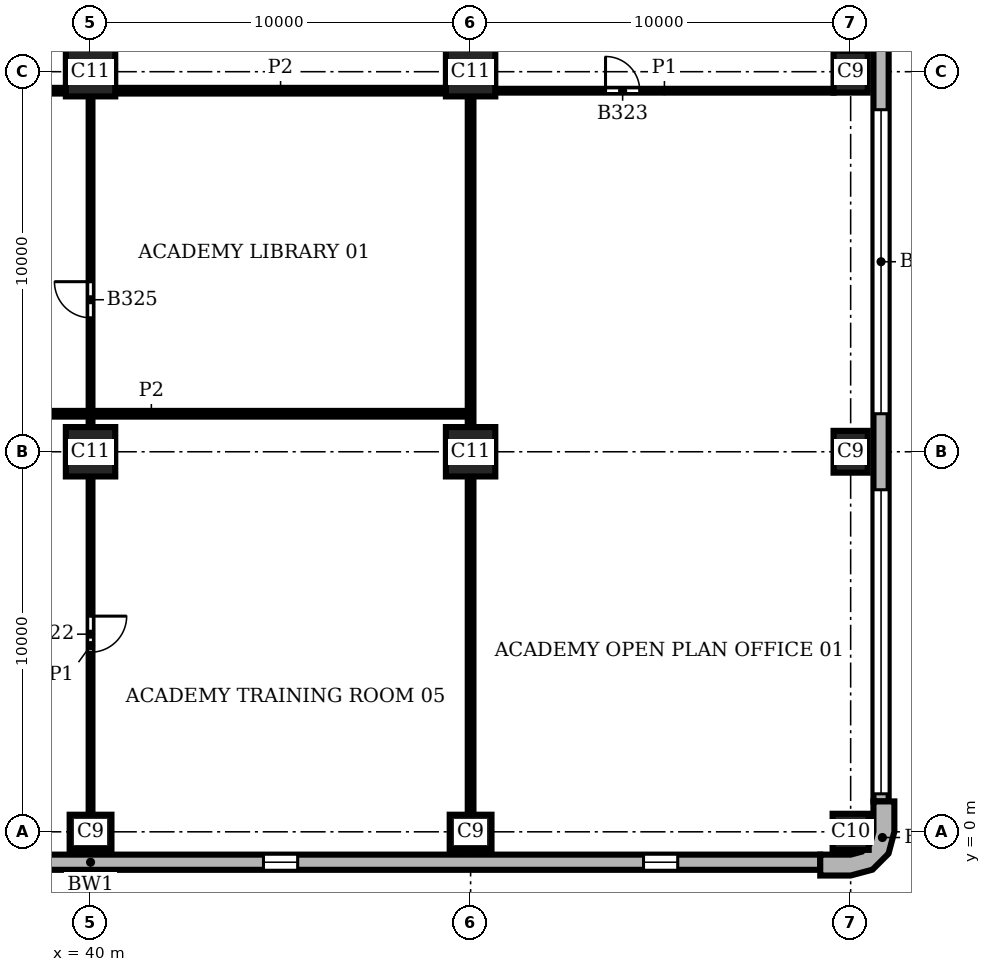
"""IFC4 building model, lengths in metres.
Left out: names, types, materials, properties, quantities, classifications, styles, units other than length and angle.
Written with IfcOpenShell. Run it as: python <this file> out.ifc"""

import sys

from ifc_helpers import new_model, si_unit, direction, frame, frame_2d, origin, origin_2d, place, context, subcontext, project, spatial, polyline, rectangle, outline, extrude, element, fill, save


model = new_model("IFC4")
c1 = context("Model", 3, precision=1e-05, world=origin(), true_north=direction((0.0, 1.0)))
c2 = subcontext(c1, "Body", "Model", "MODEL_VIEW")
j1 = project(units=[si_unit("LENGTHUNIT", "METRE"), si_unit("PLANEANGLEUNIT", "RADIAN")], contexts=[c1])
p1 = place(None, origin())
s1 = spatial("IfcSite", under=j1, at=p1, CompositionType="ELEMENT")
p2 = place(p1, origin())
s2 = spatial("IfcBuilding", under=s1, at=p2, CompositionType="ELEMENT")
p3 = place(p2, frame((0.0, 0.0, 155.1)))
s3 = spatial("IfcBuildingStorey", under=s2, at=p3, CompositionType="ELEMENT", Elevation=155.1)
for number, where, z_axis, x_axis in (
    (1, (40.0, 0.0, 0.0), (0.0, 0.0, 1.0), (1.0, 0.0, 0.0)),
    (2, (50.0, 0.0, 0.0), (0.0, 0.0, 1.0), (1.0, 0.0, 0.0)),
):
    element("IfcColumn", number, at=place(p3, frame(where, z_axis=z_axis, x_axis=x_axis)), inside=s3, PredefinedType="COLUMN", context=c2, shape_type="SweptSolid", body=[
        extrude(rectangle(XDim=1.1, YDim=0.9, at=origin_2d()), origin(), (0.0, 0.0, 1.0), 3.9),
    ])
p4 = place(p3, frame((60.0, 0.0, 0.0), z_axis=(0.0, 0.0, 1.0), x_axis=(1.0, 0.0, 0.0)))
e3 = element("IfcColumn", 3, at=p4, inside=s3, PredefinedType="COLUMN", context=c2, shape_type="SweptSolid", body=[
    extrude(rectangle(XDim=0.95, YDim=0.95, at=origin_2d()), origin(), (0.0, 0.0, 1.0), 3.9),
])
for number, where, z_axis, x_axis in (
    (4, (60.0, 10.0, 0.0), (0.0, 0.0, 1.0), (0.0, 1.0, 0.0)),
    (5, (60.0, 20.0, 0.0), (0.0, 0.0, 1.0), (0.0, 1.0, 0.0)),
):
    element("IfcColumn", number, at=place(p3, frame(where, z_axis=z_axis, x_axis=x_axis)), inside=s3, PredefinedType="COLUMN", context=c2, shape_type="SweptSolid", body=[
        extrude(rectangle(XDim=1.1, YDim=0.9, at=origin_2d()), origin(), (0.0, 0.0, 1.0), 3.9),
    ])
for number, where, z_axis, x_axis in (
    (6, (40.0, 10.0, 0.0), (0.0, 0.0, 1.0), (1.0, 0.0, 0.0)),
    (7, (40.0, 20.0, 0.0), (0.0, 0.0, 1.0), (1.0, 0.0, 0.0)),
    (8, (50.0, 10.0, 0.0), (0.0, 0.0, 1.0), (1.0, 0.0, 0.0)),
    (9, (50.0, 20.0, 0.0), (0.0, 0.0, 1.0), (1.0, 0.0, 0.0)),
):
    element("IfcColumn", number, at=place(p3, frame(where, z_axis=z_axis, x_axis=x_axis)), inside=s3, PredefinedType="COLUMN", context=c2, shape_type="SweptSolid", body=[
        extrude(rectangle(XDim=1.3, YDim=1.3, at=origin_2d()), origin(), (0.0, 0.0, 1.0), 3.9),
    ])
p5 = place(p3, origin())
e10 = element("IfcWall", 10, at=p5, inside=s3, PredefinedType="SOLIDWALL", context=c2, shape_type="SweptSolid", body=[
    extrude(outline(polyline([(59.2, -1.0), (59.2, -1.15), (60.0, -1.15), (60.575, -0.996), (60.996, -0.575), (61.15, 0.0), (61.15, 0.8), (61.0, 0.8), (60.6, 0.8), (60.6, 0.0), (60.52, -0.3), (60.3, -0.52), (60.0, -0.6), (59.2, -0.6), (59.2, -1.0)])), origin(), (0.0, 0.0, 1.0), 3.9),
])
p6 = place(p3, frame((20.8, -0.8, 0.0), z_axis=(0.0, 0.0, 1.0), x_axis=(1.0, 0.0, 0.0)))
e11 = element("IfcWall", 11, at=p6, inside=s3, PredefinedType="SOLIDWALL", context=c2, shape_type="SweptSolid", body=[
    extrude(rectangle(XDim=38.4, YDim=0.4, at=frame_2d((19.2, 0.0))), origin(), (0.0, 0.0, 1.0), 3.9),
])
p7 = place(p6, frame((3.75, 0.0, 0.9)))
e12 = element("IfcOpeningElement", 12, at=p7, cuts=e11, PredefinedType="OPENING", context=c2, shape_type="SweptSolid", body=[
    extrude(rectangle(XDim=0.9, YDim=2.35, at=frame_2d((0.45, 1.175))), frame((0.0, 0.21, 0.0), z_axis=(0.0, -1.0, 0.0), x_axis=(1.0, 0.0, 0.0)), (0.0, 0.0, 1.0), 0.42),
])
p8 = place(p6, frame((13.75, 0.0, 0.9)))
e13 = element("IfcOpeningElement", 13, at=p8, cuts=e11, PredefinedType="OPENING", context=c2, shape_type="SweptSolid", body=[
    extrude(rectangle(XDim=0.9, YDim=2.35, at=frame_2d((0.45, 1.175))), frame((0.0, 0.21, 0.0), z_axis=(0.0, -1.0, 0.0), x_axis=(1.0, 0.0, 0.0)), (0.0, 0.0, 1.0), 0.42),
])
p9 = place(p6, frame((23.75, 0.0, 0.9)))
e14 = element("IfcOpeningElement", 14, at=p9, cuts=e11, PredefinedType="OPENING", context=c2, shape_type="SweptSolid", body=[
    extrude(rectangle(XDim=0.9, YDim=2.35, at=frame_2d((0.45, 1.175))), frame((0.0, 0.21, 0.0), z_axis=(0.0, -1.0, 0.0), x_axis=(1.0, 0.0, 0.0)), (0.0, 0.0, 1.0), 0.42),
])
p10 = place(p6, frame((33.75, 0.0, 0.9)))
e15 = element("IfcOpeningElement", 15, at=p10, cuts=e11, PredefinedType="OPENING", context=c2, shape_type="SweptSolid", body=[
    extrude(rectangle(XDim=0.9, YDim=2.35, at=frame_2d((0.45, 1.175))), frame((0.0, 0.21, 0.0), z_axis=(0.0, -1.0, 0.0), x_axis=(1.0, 0.0, 0.0)), (0.0, 0.0, 1.0), 0.42),
])
p11 = place(p3, frame((60.8, 0.8, 0.0), z_axis=(0.0, 0.0, 1.0), x_axis=(0.0, 1.0, 0.0)))
e16 = element("IfcWall", 16, at=p11, inside=s3, PredefinedType="SOLIDWALL", context=c2, shape_type="SweptSolid", body=[
    extrude(rectangle(XDim=28.4, YDim=0.4, at=frame_2d((14.2, 0.0))), origin(), (0.0, 0.0, 1.0), 3.9),
])
p12 = place(p11, frame((0.2, 0.0, 0.9)))
e17 = element("IfcOpeningElement", 17, at=p12, cuts=e16, PredefinedType="OPENING", context=c2, shape_type="SweptSolid", body=[
    extrude(rectangle(XDim=8.0, YDim=2.35, at=frame_2d((4.0, 1.175))), frame((0.0, 0.21, 0.0), z_axis=(0.0, -1.0, 0.0), x_axis=(1.0, 0.0, 0.0)), (0.0, 0.0, 1.0), 0.42),
])
p13 = place(p11, frame((10.2, 0.0, 0.9)))
e18 = element("IfcOpeningElement", 18, at=p13, cuts=e16, PredefinedType="OPENING", context=c2, shape_type="SweptSolid", body=[
    extrude(rectangle(XDim=8.0, YDim=2.35, at=frame_2d((4.0, 1.175))), frame((0.0, 0.21, 0.0), z_axis=(0.0, -1.0, 0.0), x_axis=(1.0, 0.0, 0.0)), (0.0, 0.0, 1.0), 0.42),
])
p14 = place(p11, frame((20.2, 0.0, 0.9)))
e19 = element("IfcOpeningElement", 19, at=p14, cuts=e16, PredefinedType="OPENING", context=c2, shape_type="SweptSolid", body=[
    extrude(rectangle(XDim=8.0, YDim=2.35, at=frame_2d((4.0, 1.175))), frame((0.0, 0.21, 0.0), z_axis=(0.0, -1.0, 0.0), x_axis=(1.0, 0.0, 0.0)), (0.0, 0.0, 1.0), 0.42),
])
p15 = place(p3, frame((40.0, 0.45, 0.0), z_axis=(0.0, 0.0, 1.0), x_axis=(0.0, 1.0, 0.0)))
e20 = element("IfcWall", 20, at=p15, inside=s3, PredefinedType="PARTITIONING", context=c2, shape_type="SweptSolid", body=[
    extrude(rectangle(XDim=8.9, YDim=0.1, at=frame_2d((4.45, 0.0))), origin(), (0.0, 0.0, 1.0), 3.58),
])
p16 = place(p15, frame((4.275, 0.0, 0.0)))
e21 = element("IfcOpeningElement", 21, at=p16, cuts=e20, PredefinedType="OPENING", context=c2, shape_type="SweptSolid", body=[
    extrude(rectangle(XDim=0.95, YDim=2.1, at=frame_2d((0.475, 1.05))), frame((0.0, 0.06, 0.0), z_axis=(0.0, -1.0, 0.0), x_axis=(1.0, 0.0, 0.0)), (0.0, 0.0, 1.0), 0.12),
])
p17 = place(p3, frame((40.0, 10.65, 0.0), z_axis=(0.0, 0.0, 1.0), x_axis=(0.0, 1.0, 0.0)))
e22 = element("IfcWall", 22, at=p17, inside=s3, PredefinedType="PARTITIONING", context=c2, shape_type="SweptSolid", body=[
    extrude(rectangle(XDim=8.7, YDim=0.1, at=frame_2d((4.35, 0.0))), origin(), (0.0, 0.0, 1.0), 3.58),
])
p18 = place(p17, frame((2.875, 0.0, 0.0)))
e23 = element("IfcOpeningElement", 23, at=p18, cuts=e22, PredefinedType="OPENING", context=c2, shape_type="SweptSolid", body=[
    extrude(rectangle(XDim=0.95, YDim=2.1, at=frame_2d((0.475, 1.05))), frame((0.0, 0.06, 0.0), z_axis=(0.0, -1.0, 0.0), x_axis=(1.0, 0.0, 0.0)), (0.0, 0.0, 1.0), 0.12),
])
p19 = place(p3, frame((50.65, 19.5, 0.0), z_axis=(0.0, 0.0, 1.0), x_axis=(1.0, 0.0, 0.0)))
e24 = element("IfcWall", 24, at=p19, inside=s3, PredefinedType="PARTITIONING", context=c2, shape_type="SweptSolid", body=[
    extrude(rectangle(XDim=8.9, YDim=0.1, at=frame_2d((4.45, 0.0))), origin(), (0.0, 0.0, 1.0), 3.58),
])
p20 = place(p19, frame((2.9, 0.0, 0.0)))
e25 = element("IfcOpeningElement", 25, at=p20, cuts=e24, PredefinedType="OPENING", context=c2, shape_type="SweptSolid", body=[
    extrude(rectangle(XDim=0.9, YDim=2.1, at=frame_2d((0.45, 1.05))), frame((0.0, 0.06, 0.0), z_axis=(0.0, -1.0, 0.0), x_axis=(1.0, 0.0, 0.0)), (0.0, 0.0, 1.0), 0.12),
])
p21 = place(p3, frame((50.0, 0.45, 0.0), z_axis=(0.0, 0.0, 1.0), x_axis=(0.0, 1.0, 0.0)))
e26 = element("IfcWall", 26, at=p21, inside=s3, PredefinedType="PARTITIONING", context=c2, shape_type="SweptSolid", body=[
    extrude(rectangle(XDim=8.9, YDim=0.15, at=frame_2d((4.45, 0.0))), origin(), (0.0, 0.0, 1.0), 3.58),
])
p22 = place(p3, frame((50.0, 10.65, 0.0), z_axis=(0.0, 0.0, 1.0), x_axis=(0.0, 1.0, 0.0)))
e27 = element("IfcWall", 27, at=p22, inside=s3, PredefinedType="PARTITIONING", context=c2, shape_type="SweptSolid", body=[
    extrude(rectangle(XDim=8.7, YDim=0.15, at=frame_2d((4.35, 0.0))), origin(), (0.0, 0.0, 1.0), 3.58),
])
p23 = place(p3, frame((33.2, 11.0, 0.0), z_axis=(0.0, 0.0, 1.0), x_axis=(1.0, 0.0, 0.0)))
e28 = element("IfcWall", 28, at=p23, inside=s3, PredefinedType="PARTITIONING", context=c2, shape_type="SweptSolid", body=[
    extrude(rectangle(XDim=16.8, YDim=0.15, at=frame_2d((8.4, 0.0))), origin(), (0.0, 0.0, 1.0), 3.58),
])
p24 = place(p3, frame((33.2, 19.5, 0.0), z_axis=(0.0, 0.0, 1.0), x_axis=(1.0, 0.0, 0.0)))
e29 = element("IfcWall", 29, at=p24, inside=s3, PredefinedType="PARTITIONING", context=c2, shape_type="SweptSolid", body=[
    extrude(rectangle(XDim=6.15, YDim=0.15, at=frame_2d((3.075, 0.0))), origin(), (0.0, 0.0, 1.0), 3.58),
])
p25 = place(p3, frame((40.65, 19.5, 0.0), z_axis=(0.0, 0.0, 1.0), x_axis=(1.0, 0.0, 0.0)))
e30 = element("IfcWall", 30, at=p25, inside=s3, PredefinedType="PARTITIONING", context=c2, shape_type="SweptSolid", body=[
    extrude(rectangle(XDim=8.7, YDim=0.15, at=frame_2d((4.35, 0.0))), origin(), (0.0, 0.0, 1.0), 3.58),
])
p26 = place(p9, origin())
e31 = element("IfcWindow", 31, at=p26, inside=s3, PartitioningType="SINGLE_PANEL", PredefinedType="WINDOW", context=c2, shape_type="SweptSolid", body=[
    extrude(rectangle(XDim=0.9, YDim=2.35, at=frame_2d((0.45, 1.175))), frame((0.0, 0.16, 0.0), z_axis=(0.0, -1.0, 0.0), x_axis=(1.0, 0.0, 0.0)), (0.0, 0.0, 1.0), 0.06),
])
fill(e14, e31)
p27 = place(p10, origin())
e32 = element("IfcWindow", 32, at=p27, inside=s3, PartitioningType="SINGLE_PANEL", PredefinedType="WINDOW", context=c2, shape_type="SweptSolid", body=[
    extrude(rectangle(XDim=0.9, YDim=2.35, at=frame_2d((0.45, 1.175))), frame((0.0, 0.16, 0.0), z_axis=(0.0, -1.0, 0.0), x_axis=(1.0, 0.0, 0.0)), (0.0, 0.0, 1.0), 0.06),
])
fill(e15, e32)
p28 = place(p12, origin())
e33 = element("IfcWindow", 33, at=p28, inside=s3, PartitioningType="SINGLE_PANEL", PredefinedType="WINDOW", context=c2, shape_type="SweptSolid", body=[
    extrude(rectangle(XDim=8.0, YDim=2.35, at=frame_2d((4.0, 1.175))), frame((0.0, 0.16, 0.0), z_axis=(0.0, -1.0, 0.0), x_axis=(1.0, 0.0, 0.0)), (0.0, 0.0, 1.0), 0.06),
])
fill(e17, e33)
p29 = place(p13, origin())
e34 = element("IfcWindow", 34, at=p29, inside=s3, PartitioningType="SINGLE_PANEL", PredefinedType="WINDOW", context=c2, shape_type="SweptSolid", body=[
    extrude(rectangle(XDim=8.0, YDim=2.35, at=frame_2d((4.0, 1.175))), frame((0.0, 0.16, 0.0), z_axis=(0.0, -1.0, 0.0), x_axis=(1.0, 0.0, 0.0)), (0.0, 0.0, 1.0), 0.06),
])
fill(e18, e34)
p30 = place(p16, frame((0.95, 0.0, 0.0), z_axis=(0.0, 0.0, 1.0), x_axis=(-1.0, 0.0, 0.0)))
e35 = element("IfcDoor", 35, at=p30, inside=s3, OperationType="SINGLE_SWING_LEFT", PredefinedType="DOOR", context=c2, shape_type="SweptSolid", body=[
    extrude(rectangle(XDim=0.95, YDim=2.1, at=frame_2d((0.475, 1.05))), frame((0.0, 0.025, 0.0), z_axis=(0.0, -1.0, 0.0), x_axis=(1.0, 0.0, 0.0)), (0.0, 0.0, 1.0), 0.05),
])
fill(e21, e35)
p31 = place(p20, origin())
e36 = element("IfcDoor", 36, at=p31, inside=s3, OperationType="SINGLE_SWING_LEFT", PredefinedType="DOOR", context=c2, shape_type="SweptSolid", body=[
    extrude(rectangle(XDim=0.9, YDim=2.1, at=frame_2d((0.45, 1.05))), frame((0.0, 0.025, 0.0), z_axis=(0.0, -1.0, 0.0), x_axis=(1.0, 0.0, 0.0)), (0.0, 0.0, 1.0), 0.05),
])
fill(e25, e36)
p32 = place(p18, origin())
e37 = element("IfcDoor", 37, at=p32, inside=s3, OperationType="SINGLE_SWING_RIGHT", PredefinedType="DOOR", context=c2, shape_type="SweptSolid", body=[
    extrude(rectangle(XDim=0.95, YDim=2.1, at=frame_2d((0.475, 1.05))), frame((0.0, 0.025, 0.0), z_axis=(0.0, -1.0, 0.0), x_axis=(1.0, 0.0, 0.0)), (0.0, 0.0, 1.0), 0.05),
])
fill(e23, e37)
save(model, sys.argv[1])
